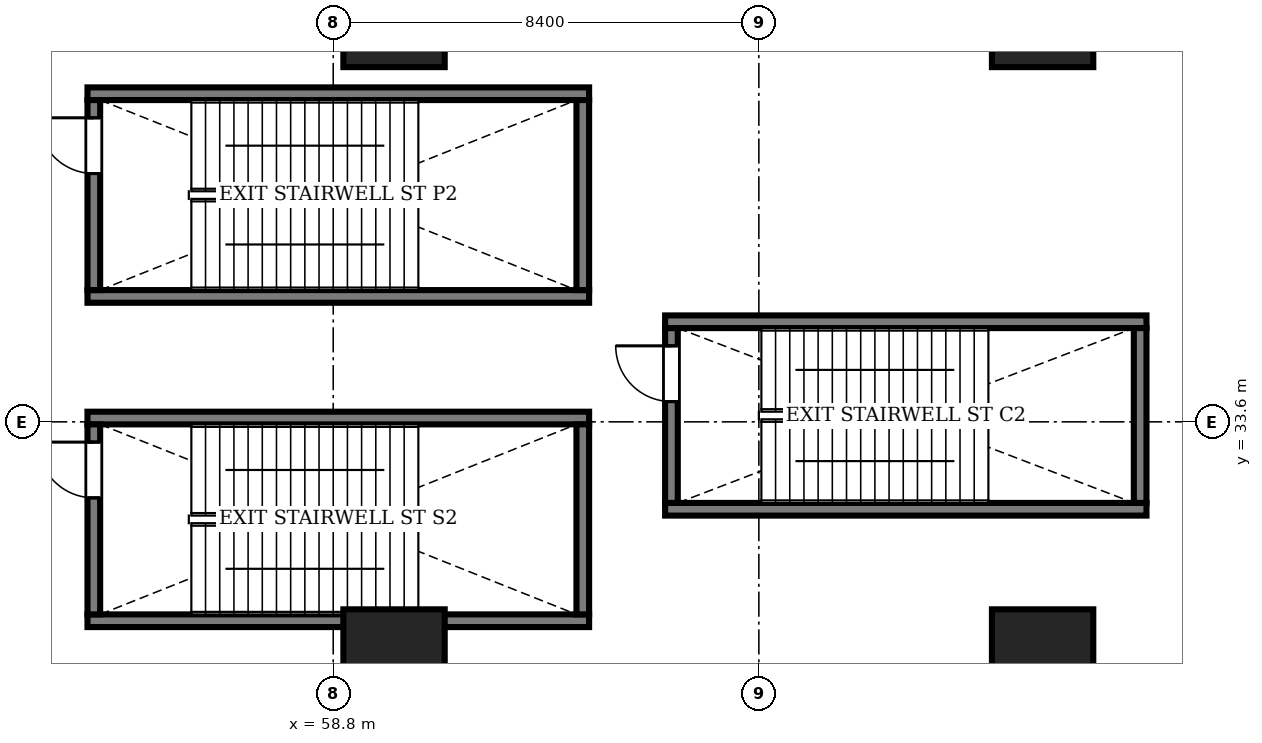
"""IFC4 building model, lengths in metres.
Left out: names, types, materials, properties, quantities, classifications, styles, units other than length and angle.
Written with IfcOpenShell. Run it as: python <this file> out.ifc"""

import sys

from ifc_helpers import new_model, si_unit, direction, frame, frame_2d, origin, origin_2d, place, context, subcontext, project, spatial, rectangle, extrude, source, transform, mapped, element, fill, save


model = new_model("IFC4")
c1 = context("Model", 3, precision=1e-05, world=origin(), true_north=direction((0.0, 1.0)))
c2 = subcontext(c1, "Body", "Model", "MODEL_VIEW")
j1 = project(units=[si_unit("LENGTHUNIT", "METRE"), si_unit("PLANEANGLEUNIT", "RADIAN")], contexts=[c1])
p1 = place(None, origin())
s1 = spatial("IfcSite", under=j1, at=p1, CompositionType="ELEMENT")
p2 = place(p1, origin())
s2 = spatial("IfcBuilding", under=s1, at=p2, CompositionType="ELEMENT")
p3 = place(p2, frame((0.0, 0.0, -6.0)))
s3 = spatial("IfcBuildingStorey", under=s2, at=p3, CompositionType="ELEMENT", Elevation=-6.0)
m1 = source(origin(), c2, "Body", "SweptSolid", [
    extrude(rectangle(XDim=2.0, YDim=2.0, at=origin_2d()), origin(), (0.0, 0.0, 1.0), 5.6),
])
for number, where, z_axis, x_axis in (
    (1, (60.0, 28.9, 0.0), (0.0, 0.0, 1.0), (1.0, 0.0, 0.0)),
    (2, (72.8, 28.9, 0.0), (0.0, 0.0, 1.0), (1.0, 0.0, 0.0)),
    (3, (60.0, 41.6, 0.0), (0.0, 0.0, 1.0), (1.0, 0.0, 0.0)),
    (4, (72.8, 41.6, 0.0), (0.0, 0.0, 1.0), (1.0, 0.0, 0.0)),
):
    element("IfcColumn", number, at=place(p3, frame(where, z_axis=z_axis, x_axis=x_axis)), inside=s3, PredefinedType="COLUMN", context=c2, shape_type="MappedRepresentation", body=[
        mapped(m1, transform((0.0, 0.0, 0.0), scale=1.0)),
    ])
m2 = source(origin(), c2, "Body", "SweptSolid", [
    extrude(rectangle(XDim=9.9, YDim=0.25, at=frame_2d((4.95, 0.0))), origin(), (0.0, 0.0, 1.0), 5.8),
])
for number, where, z_axis, x_axis in (
    (5, (53.95, 29.675, 0.0), (0.0, 0.0, 1.0), (1.0, 0.0, 0.0)),
    (6, (53.95, 33.675, 0.0), (0.0, 0.0, 1.0), (1.0, 0.0, 0.0)),
):
    element("IfcWall", number, at=place(p3, frame(where, z_axis=z_axis, x_axis=x_axis)), inside=s3, PredefinedType="SOLIDWALL", context=c2, shape_type="MappedRepresentation", body=[
        mapped(m2, transform((0.0, 0.0, 0.0), scale=1.0)),
    ])
m3 = source(origin(), c2, "Body", "SweptSolid", [
    extrude(rectangle(XDim=3.75, YDim=0.25, at=frame_2d((1.875, 0.0))), origin(), (0.0, 0.0, 1.0), 5.8),
])
p4 = place(p3, frame((63.725, 29.8, 0.0), z_axis=(0.0, 0.0, 1.0), x_axis=(0.0, 1.0, 0.0)))
e7 = element("IfcWall", 7, at=p4, inside=s3, PredefinedType="SOLIDWALL", context=c2, shape_type="MappedRepresentation", body=[
    mapped(m3, transform((0.0, 0.0, 0.0), scale=1.0)),
])
p5 = place(p3, frame((54.075, 29.8, 0.0), z_axis=(0.0, 0.0, 1.0), x_axis=(0.0, 1.0, 0.0)))
e8 = element("IfcWall", 8, at=p5, inside=s3, PredefinedType="SOLIDWALL", context=c2, shape_type="MappedRepresentation", body=[
    mapped(m3, transform((0.0, 0.0, 0.0), scale=1.0)),
])
m4 = source(origin(), c2, "Body", "SweptSolid", [
    extrude(rectangle(XDim=1.1, YDim=2.2, at=frame_2d((0.55, 1.1))), frame((0.0, 0.135, 0.0), z_axis=(0.0, -1.0, 0.0), x_axis=(1.0, 0.0, 0.0)), (0.0, 0.0, 1.0), 0.27),
])
p6 = place(p5, frame((2.3, 0.0, 0.0)))
e9 = element("IfcOpeningElement", 9, at=p6, cuts=e8, PredefinedType="OPENING", context=c2, shape_type="MappedRepresentation", body=[
    mapped(m4, transform((0.0, 0.0, 0.0), scale=1.0)),
])
for number, where, z_axis, x_axis in (
    (10, (53.95, 36.075, 0.0), (0.0, 0.0, 1.0), (1.0, 0.0, 0.0)),
    (11, (53.95, 40.075, 0.0), (0.0, 0.0, 1.0), (1.0, 0.0, 0.0)),
):
    element("IfcWall", number, at=place(p3, frame(where, z_axis=z_axis, x_axis=x_axis)), inside=s3, PredefinedType="SOLIDWALL", context=c2, shape_type="MappedRepresentation", body=[
        mapped(m2, transform((0.0, 0.0, 0.0), scale=1.0)),
    ])
p7 = place(p3, frame((63.725, 36.2, 0.0), z_axis=(0.0, 0.0, 1.0), x_axis=(0.0, 1.0, 0.0)))
e12 = element("IfcWall", 12, at=p7, inside=s3, PredefinedType="SOLIDWALL", context=c2, shape_type="MappedRepresentation", body=[
    mapped(m3, transform((0.0, 0.0, 0.0), scale=1.0)),
])
p8 = place(p3, frame((54.075, 36.2, 0.0), z_axis=(0.0, 0.0, 1.0), x_axis=(0.0, 1.0, 0.0)))
e13 = element("IfcWall", 13, at=p8, inside=s3, PredefinedType="SOLIDWALL", context=c2, shape_type="MappedRepresentation", body=[
    mapped(m3, transform((0.0, 0.0, 0.0), scale=1.0)),
])
p9 = place(p8, frame((2.3, 0.0, 0.0)))
e14 = element("IfcOpeningElement", 14, at=p9, cuts=e13, PredefinedType="OPENING", context=c2, shape_type="MappedRepresentation", body=[
    mapped(m4, transform((0.0, 0.0, 0.0), scale=1.0)),
])
m5 = source(origin(), c2, "Body", "SweptSolid", [
    extrude(rectangle(XDim=9.5, YDim=0.25, at=frame_2d((4.75, 0.0))), origin(), (0.0, 0.0, 1.0), 5.8),
])
for number, where, z_axis, x_axis in (
    (15, (65.35, 31.875, 0.0), (0.0, 0.0, 1.0), (1.0, 0.0, 0.0)),
    (16, (65.35, 35.575, 0.0), (0.0, 0.0, 1.0), (1.0, 0.0, 0.0)),
):
    element("IfcWall", number, at=place(p3, frame(where, z_axis=z_axis, x_axis=x_axis)), inside=s3, PredefinedType="SOLIDWALL", context=c2, shape_type="MappedRepresentation", body=[
        mapped(m5, transform((0.0, 0.0, 0.0), scale=1.0)),
    ])
m6 = source(origin(), c2, "Body", "SweptSolid", [
    extrude(rectangle(XDim=3.45, YDim=0.25, at=frame_2d((1.725, 0.0))), origin(), (0.0, 0.0, 1.0), 5.8),
])
p10 = place(p3, frame((74.725, 32.0, 0.0), z_axis=(0.0, 0.0, 1.0), x_axis=(0.0, 1.0, 0.0)))
e17 = element("IfcWall", 17, at=p10, inside=s3, PredefinedType="SOLIDWALL", context=c2, shape_type="MappedRepresentation", body=[
    mapped(m6, transform((0.0, 0.0, 0.0), scale=1.0)),
])
p11 = place(p3, frame((65.475, 32.0, 0.0), z_axis=(0.0, 0.0, 1.0), x_axis=(0.0, 1.0, 0.0)))
e18 = element("IfcWall", 18, at=p11, inside=s3, PredefinedType="SOLIDWALL", context=c2, shape_type="MappedRepresentation", body=[
    mapped(m6, transform((0.0, 0.0, 0.0), scale=1.0)),
])
p12 = place(p11, frame((2.0, 0.0, 0.0)))
e19 = element("IfcOpeningElement", 19, at=p12, cuts=e18, PredefinedType="OPENING", context=c2, shape_type="MappedRepresentation", body=[
    mapped(m4, transform((0.0, 0.0, 0.0), scale=1.0)),
])
m7 = source(origin(), c2, "Body", "SweptSolid", [
    extrude(rectangle(XDim=1.1, YDim=2.2, at=frame_2d((0.55, 1.1))), frame((0.0, 0.025, 0.0), z_axis=(0.0, -1.0, 0.0), x_axis=(1.0, 0.0, 0.0)), (0.0, 0.0, 1.0), 0.05),
])
p13 = place(p6, origin())
e20 = element("IfcDoor", 20, at=p13, inside=s3, OperationType="SINGLE_SWING_RIGHT", PredefinedType="DOOR", context=c2, shape_type="MappedRepresentation", body=[
    mapped(m7, transform((0.0, 0.0, 0.0), scale=1.0)),
])
fill(e9, e20)
p14 = place(p9, origin())
e21 = element("IfcDoor", 21, at=p14, inside=s3, OperationType="SINGLE_SWING_RIGHT", PredefinedType="DOOR", context=c2, shape_type="MappedRepresentation", body=[
    mapped(m7, transform((0.0, 0.0, 0.0), scale=1.0)),
])
fill(e14, e21)
p15 = place(p12, origin())
e22 = element("IfcDoor", 22, at=p15, inside=s3, OperationType="SINGLE_SWING_RIGHT", PredefinedType="DOOR", context=c2, shape_type="MappedRepresentation", body=[
    mapped(m7, transform((0.0, 0.0, 0.0), scale=1.0)),
])
fill(e19, e22)
save(model, sys.argv[1])
